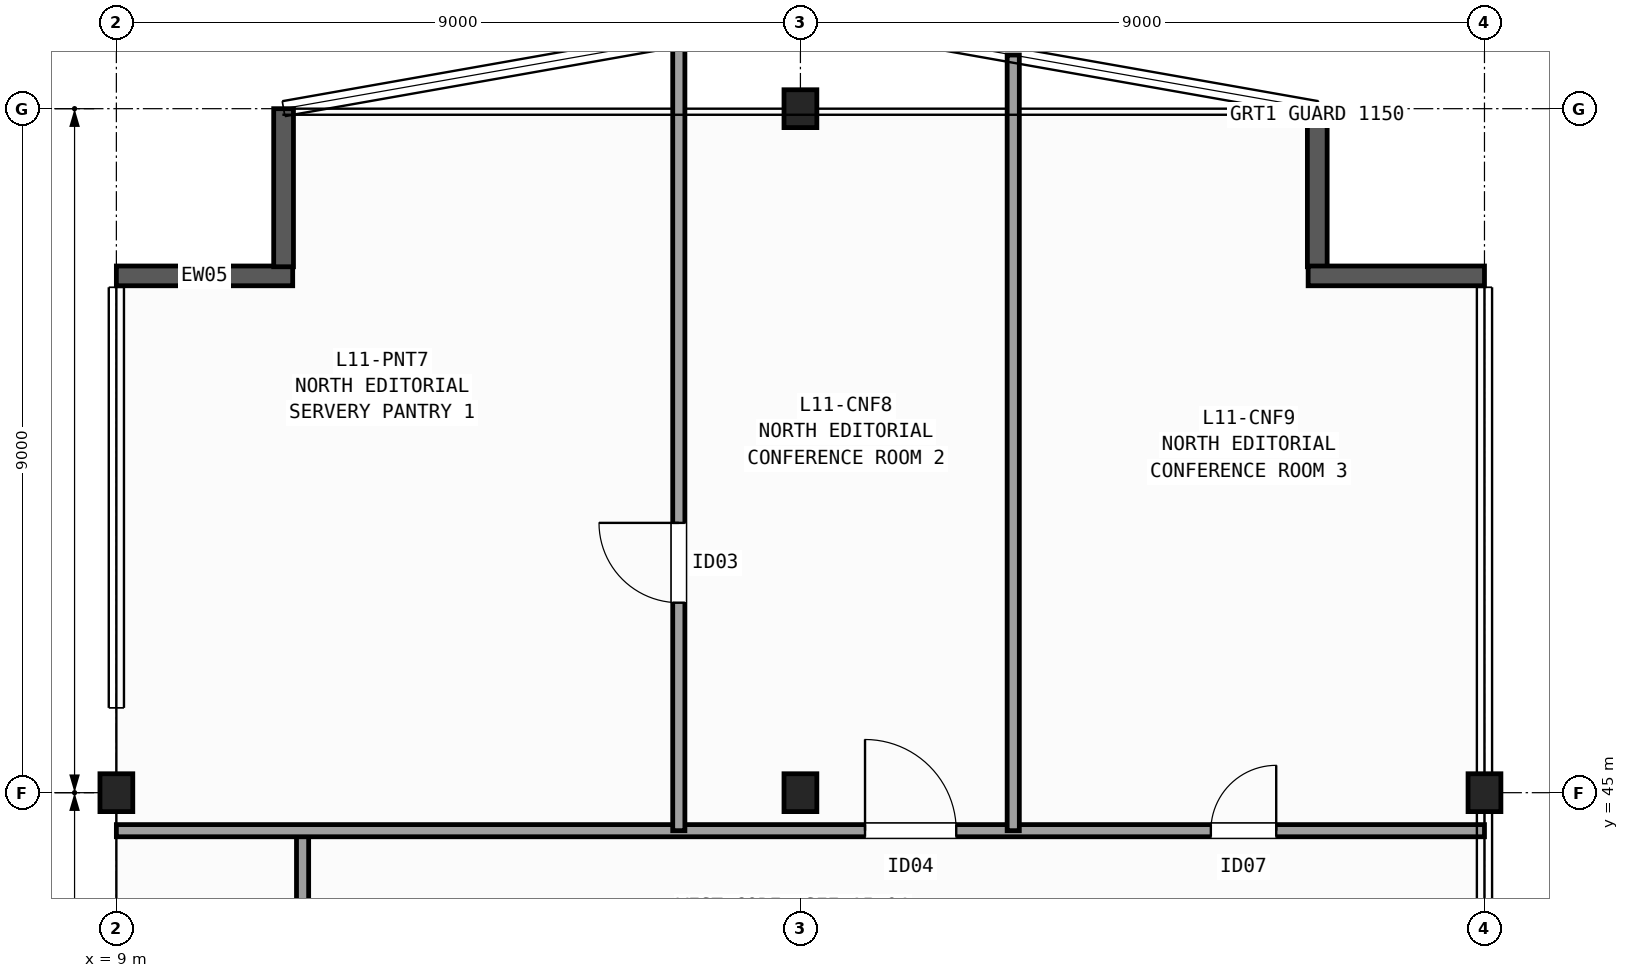
"""IFC4 building model, lengths in metres.
Left out: names, types, materials, properties, quantities, classifications, styles, units other than length and angle.
Written with IfcOpenShell. Run it as: python <this file> out.ifc"""

import sys

from ifc_helpers import new_model, si_unit, direction, frame, frame_2d, origin, origin_2d, place, context, subcontext, project, spatial, rectangle, i_section, extrude, element, fill, save


model = new_model("IFC4")
c1 = context("Model", 3, precision=1e-05, world=origin(), true_north=direction((0.0, 1.0)))
c2 = subcontext(c1, "Body", "Model", "MODEL_VIEW")
j1 = project(units=[si_unit("LENGTHUNIT", "METRE"), si_unit("PLANEANGLEUNIT", "RADIAN")], contexts=[c1])
p1 = place(None, origin())
s1 = spatial("IfcSite", under=j1, at=p1, CompositionType="ELEMENT")
p2 = place(p1, origin())
s2 = spatial("IfcBuilding", under=s1, at=p2, CompositionType="ELEMENT")
p3 = place(p2, frame((0.0, 0.0, 50.8)))
s3 = spatial("IfcBuildingStorey", under=s2, at=p3, CompositionType="ELEMENT", Elevation=50.8)
for number, where, z_axis, x_axis in (
    (1, (9.0, 45.0, 0.0), (0.0, 0.0, 1.0), (1.0, 0.0, 0.0)),
    (2, (18.0, 45.0, 0.0), (0.0, 0.0, 1.0), (1.0, 0.0, 0.0)),
    (3, (18.0, 54.0, 0.0), (0.0, 0.0, 1.0), (1.0, 0.0, 0.0)),
    (4, (27.0, 45.0, 0.0), (0.0, 0.0, 1.0), (1.0, 0.0, 0.0)),
):
    element("IfcColumn", number, at=place(p3, frame(where, z_axis=z_axis, x_axis=x_axis)), inside=s3, PredefinedType="COLUMN", context=c2, shape_type="SweptSolid", body=[
        extrude(i_section(OverallWidth=0.432, OverallDepth=0.498, WebThickness=0.056, FlangeThickness=0.089, FilletRadius=0.015, at=origin_2d()), origin(), (0.0, 0.0, 1.0), 3.7),
    ])
p4 = place(p3, frame((9.0, 51.8, 0.0), z_axis=(0.0, 0.0, 1.0), x_axis=(1.0, 0.0, 0.0)))
e5 = element("IfcWall", 5, at=p4, inside=s3, PredefinedType="SOLIDWALL", context=c2, shape_type="SweptSolid", body=[
    extrude(rectangle(XDim=2.32, YDim=0.26, at=frame_2d((1.16, 0.0))), origin(), (0.0, 0.0, 1.0), 3.42),
])
for number, where, z_axis, x_axis in (
    (6, (11.2, 51.92, 0.0), (0.0, 0.0, 1.0), (0.0, 1.0, 0.0)),
    (7, (24.8, 54.0, 0.0), (0.0, 0.0, 1.0), (0.0, -1.0, 0.0)),
):
    element("IfcWall", number, at=place(p3, frame(where, z_axis=z_axis, x_axis=x_axis)), inside=s3, PredefinedType="SOLIDWALL", context=c2, shape_type="SweptSolid", body=[
        extrude(rectangle(XDim=2.08, YDim=0.26, at=frame_2d((1.04, 0.0))), origin(), (0.0, 0.0, 1.0), 3.42),
    ])
p5 = place(p3, frame((24.68, 51.8, 0.0), z_axis=(0.0, 0.0, 1.0), x_axis=(1.0, 0.0, 0.0)))
e8 = element("IfcWall", 8, at=p5, inside=s3, PredefinedType="SOLIDWALL", context=c2, shape_type="SweptSolid", body=[
    extrude(rectangle(XDim=2.32, YDim=0.26, at=frame_2d((1.16, 0.0))), origin(), (0.0, 0.0, 1.0), 3.42),
])
p6 = place(p3, frame((11.45, 42.4, 0.0), z_axis=(0.0, 0.0, 1.0), x_axis=(0.0, 1.0, 0.0)))
e9 = element("IfcWall", 9, at=p6, inside=s3, PredefinedType="PARTITIONING", context=c2, shape_type="SweptSolid", body=[
    extrude(rectangle(XDim=2.1, YDim=0.16, at=frame_2d((1.05, 0.0))), origin(), (0.0, 0.0, 1.0), 3.42),
])
p7 = place(p3, frame((9.0, 44.5, 0.0), z_axis=(0.0, 0.0, 1.0), x_axis=(1.0, 0.0, 0.0)))
e10 = element("IfcWall", 10, at=p7, inside=s3, PredefinedType="PARTITIONING", context=c2, shape_type="SweptSolid", body=[
    extrude(rectangle(XDim=18.0, YDim=0.16, at=frame_2d((9.0, 0.0))), origin(), (0.0, 0.0, 1.0), 2.627),
])
p8 = place(p7, frame((9.85, 0.0, 0.0)))
e11 = element("IfcOpeningElement", 11, at=p8, cuts=e10, PredefinedType="OPENING", context=c2, shape_type="SweptSolid", body=[
    extrude(rectangle(XDim=1.2, YDim=2.15, at=frame_2d((0.6, 1.075))), frame((0.0, 0.09, 0.0), z_axis=(0.0, -1.0, 0.0), x_axis=(1.0, 0.0, 0.0)), (0.0, 0.0, 1.0), 0.18),
])
p9 = place(p7, frame((14.4, 0.0, 0.0)))
e12 = element("IfcOpeningElement", 12, at=p9, cuts=e10, PredefinedType="OPENING", context=c2, shape_type="SweptSolid", body=[
    extrude(rectangle(XDim=0.86, YDim=2.05, at=frame_2d((0.43, 1.025))), frame((0.0, 0.09, 0.0), z_axis=(0.0, -1.0, 0.0), x_axis=(1.0, 0.0, 0.0)), (0.0, 0.0, 1.0), 0.18),
])
p10 = place(p3, frame((16.4, 44.5, 0.0), z_axis=(0.0, 0.0, 1.0), x_axis=(0.0, 1.0, 0.0)))
e13 = element("IfcWall", 13, at=p10, inside=s3, PredefinedType="PARTITIONING", context=c2, shape_type="SweptSolid", body=[
    extrude(rectangle(XDim=10.418, YDim=0.16, at=frame_2d((5.209, 0.0))), origin(), (0.0, 0.0, 1.0), 3.42),
])
p11 = place(p10, frame((3.0, 0.0, 0.0)))
e14 = element("IfcOpeningElement", 14, at=p11, cuts=e13, PredefinedType="OPENING", context=c2, shape_type="SweptSolid", body=[
    extrude(rectangle(XDim=1.05, YDim=2.15, at=frame_2d((0.525, 1.075))), frame((0.0, 0.09, 0.0), z_axis=(0.0, -1.0, 0.0), x_axis=(1.0, 0.0, 0.0)), (0.0, 0.0, 1.0), 0.18),
])
p12 = place(p3, frame((20.8, 44.5, 0.0), z_axis=(0.0, 0.0, 1.0), x_axis=(0.0, 1.0, 0.0)))
e15 = element("IfcWall", 15, at=p12, inside=s3, PredefinedType="PARTITIONING", context=c2, shape_type="SweptSolid", body=[
    extrude(rectangle(XDim=10.206, YDim=0.16, at=frame_2d((5.103, 0.0))), origin(), (0.0, 0.0, 1.0), 3.42),
])
p13 = place(p11, origin())
e16 = element("IfcDoor", 16, at=p13, inside=s3, OperationType="SINGLE_SWING_RIGHT", PredefinedType="DOOR", context=c2, shape_type="SweptSolid", body=[
    extrude(rectangle(XDim=1.05, YDim=2.15, at=frame_2d((0.525, 1.075))), frame((0.0, 0.025, 0.0), z_axis=(0.0, -1.0, 0.0), x_axis=(1.0, 0.0, 0.0)), (0.0, 0.0, 1.0), 0.05),
])
fill(e14, e16)
p14 = place(p8, origin())
e17 = element("IfcDoor", 17, at=p14, inside=s3, OperationType="SINGLE_SWING_LEFT", PredefinedType="DOOR", context=c2, shape_type="SweptSolid", body=[
    extrude(rectangle(XDim=1.2, YDim=2.15, at=frame_2d((0.6, 1.075))), frame((0.0, 0.025, 0.0), z_axis=(0.0, -1.0, 0.0), x_axis=(1.0, 0.0, 0.0)), (0.0, 0.0, 1.0), 0.05),
])
fill(e11, e17)
p15 = place(p9, origin())
e18 = element("IfcDoor", 18, at=p15, inside=s3, OperationType="SINGLE_SWING_RIGHT", PredefinedType="DOOR", context=c2, shape_type="SweptSolid", body=[
    extrude(rectangle(XDim=0.86, YDim=2.05, at=frame_2d((0.43, 1.025))), frame((0.0, 0.025, 0.0), z_axis=(0.0, -1.0, 0.0), x_axis=(1.0, 0.0, 0.0)), (0.0, 0.0, 1.0), 0.05),
])
fill(e12, e18)
save(model, sys.argv[1])
